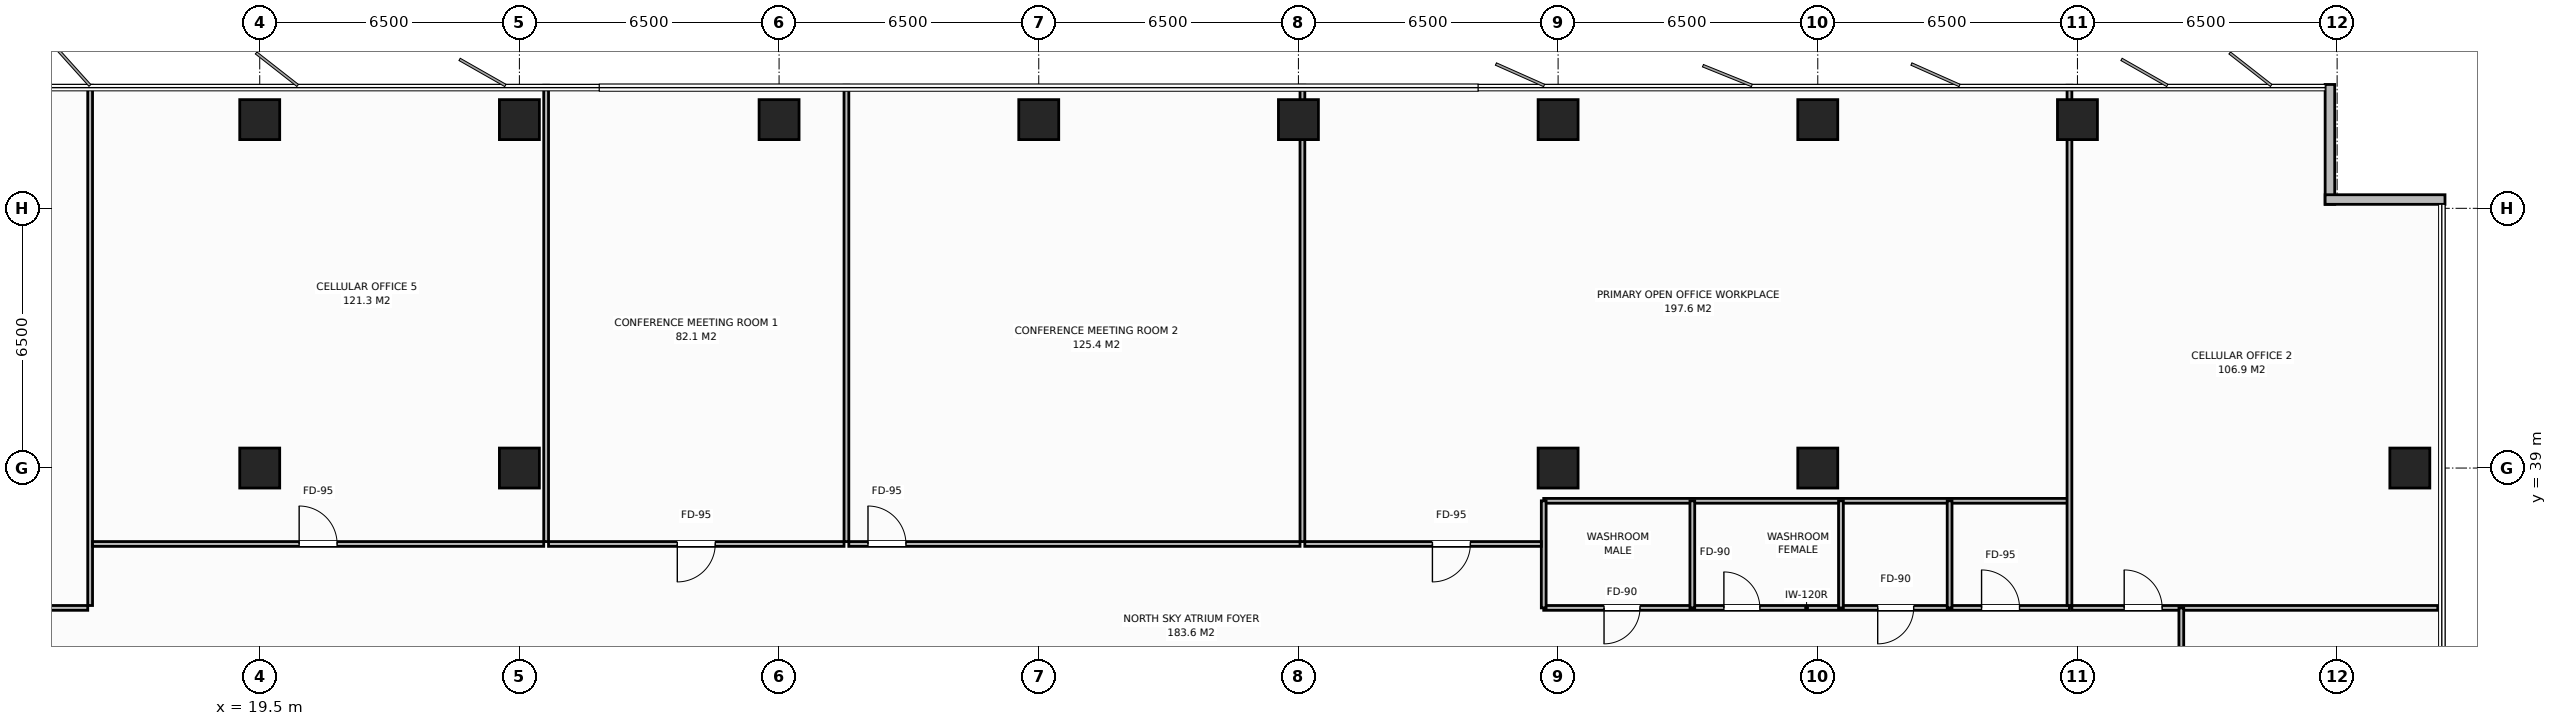
"""IFC4 building model, lengths in metres.
Left out: names, types, materials, properties, quantities, classifications, styles, units other than length and angle.
Written with IfcOpenShell. Run it as: python <this file> out.ifc"""

import sys

from ifc_helpers import new_model, si_unit, direction, frame, frame_2d, origin, origin_2d, place, context, subcontext, project, spatial, rectangle, extrude, element, fill, save


model = new_model("IFC4")
c1 = context("Model", 3, precision=1e-05, world=origin(), true_north=direction((0.0, 1.0)))
c2 = subcontext(c1, "Body", "Model", "MODEL_VIEW")
j1 = project(units=[si_unit("LENGTHUNIT", "METRE"), si_unit("PLANEANGLEUNIT", "RADIAN")], contexts=[c1])
p1 = place(None, origin())
s1 = spatial("IfcSite", under=j1, at=p1, CompositionType="ELEMENT")
p2 = place(p1, origin())
s2 = spatial("IfcBuilding", under=s1, at=p2, CompositionType="ELEMENT")
p3 = place(p2, frame((0.0, 0.0, 170.8)))
s3 = spatial("IfcBuildingStorey", under=s2, at=p3, CompositionType="ELEMENT", Elevation=170.8)
for number, where, z_axis, x_axis in (
    (1, (19.5, 39.0, 0.0), (0.0, 0.0, 1.0), (1.0, 0.0, 0.0)),
    (2, (58.5, 39.0, 0.0), (0.0, 0.0, 1.0), (1.0, 0.0, 0.0)),
    (3, (26.0, 39.0, 0.0), (0.0, 0.0, 1.0), (1.0, 0.0, 0.0)),
    (4, (52.0, 39.0, 0.0), (0.0, 0.0, 1.0), (1.0, 0.0, 0.0)),
    (5, (19.5, 47.72, 0.0), (0.0, 0.0, 1.0), (1.0, 0.0, 0.0)),
    (6, (26.0, 47.72, 0.0), (0.0, 0.0, 1.0), (1.0, 0.0, 0.0)),
    (7, (32.5, 47.72, 0.0), (0.0, 0.0, 1.0), (1.0, 0.0, 0.0)),
    (8, (39.0, 47.72, 0.0), (0.0, 0.0, 1.0), (1.0, 0.0, 0.0)),
    (9, (45.5, 47.72, 0.0), (0.0, 0.0, 1.0), (1.0, 0.0, 0.0)),
    (10, (52.0, 47.72, 0.0), (0.0, 0.0, 1.0), (1.0, 0.0, 0.0)),
    (11, (58.5, 47.72, 0.0), (0.0, 0.0, 1.0), (1.0, 0.0, 0.0)),
    (12, (65.0, 47.72, 0.0), (0.0, 0.0, 1.0), (1.0, 0.0, 0.0)),
    (13, (73.32, 39.0, 0.0), (0.0, 0.0, 1.0), (1.0, 0.0, 0.0)),
):
    element("IfcColumn", number, at=place(p3, frame(where, z_axis=z_axis, x_axis=x_axis)), inside=s3, PredefinedType="COLUMN", context=c2, shape_type="SweptSolid", body=[
        extrude(rectangle(XDim=1.0, YDim=1.0, at=origin_2d()), origin(), (0.0, 0.0, 1.0), 3.8),
    ])
for number, where, z_axis, x_axis in (
    (14, (71.32, 48.6, 0.0), (0.0, 0.0, 1.0), (0.0, -1.0, 0.0)),
    (15, (71.2, 45.72, 0.0), (0.0, 0.0, 1.0), (1.0, 0.0, 0.0)),
):
    element("IfcWall", number, at=place(p3, frame(where, z_axis=z_axis, x_axis=x_axis)), inside=s3, PredefinedType="STANDARD", context=c2, shape_type="SweptSolid", body=[
        extrude(rectangle(XDim=3.0, YDim=0.24, at=frame_2d((1.5, 0.0))), origin(), (0.0, 0.0, 1.0), 3.572),
    ])
p4 = place(p3, frame((51.64, 35.5, 0.0), z_axis=(0.0, 0.0, 1.0), x_axis=(1.0, 0.0, 0.0)))
e16 = element("IfcWall", 16, at=p4, inside=s3, PredefinedType="PARTITIONING", context=c2, shape_type="SweptSolid", body=[
    extrude(rectangle(XDim=13.16, YDim=0.12, at=frame_2d((6.58, 0.0))), origin(), (0.0, 0.0, 1.0), 3.572),
])
p5 = place(p4, frame((1.51, 0.0, 0.0)))
e17 = element("IfcOpeningElement", 17, at=p5, cuts=e16, PredefinedType="OPENING", context=c2, shape_type="SweptSolid", body=[
    extrude(rectangle(XDim=0.9, YDim=2.15, at=frame_2d((0.45, 1.075))), frame((0.0, 0.07, 0.0), z_axis=(0.0, -1.0, 0.0), x_axis=(1.0, 0.0, 0.0)), (0.0, 0.0, 1.0), 0.14),
])
p6 = place(p4, frame((4.51, 0.0, 0.0)))
e18 = element("IfcOpeningElement", 18, at=p6, cuts=e16, PredefinedType="OPENING", context=c2, shape_type="SweptSolid", body=[
    extrude(rectangle(XDim=0.9, YDim=2.15, at=frame_2d((0.45, 1.075))), frame((0.0, 0.07, 0.0), z_axis=(0.0, -1.0, 0.0), x_axis=(1.0, 0.0, 0.0)), (0.0, 0.0, 1.0), 0.14),
])
p7 = place(p4, frame((8.36, 0.0, 0.0)))
e19 = element("IfcOpeningElement", 19, at=p7, cuts=e16, PredefinedType="OPENING", context=c2, shape_type="SweptSolid", body=[
    extrude(rectangle(XDim=0.9, YDim=2.15, at=frame_2d((0.45, 1.075))), frame((0.0, 0.07, 0.0), z_axis=(0.0, -1.0, 0.0), x_axis=(1.0, 0.0, 0.0)), (0.0, 0.0, 1.0), 0.14),
])
p8 = place(p4, frame((10.96, 0.0, 0.0)))
e20 = element("IfcOpeningElement", 20, at=p8, cuts=e16, PredefinedType="OPENING", context=c2, shape_type="SweptSolid", body=[
    extrude(rectangle(XDim=0.95, YDim=2.15, at=frame_2d((0.475, 1.075))), frame((0.0, 0.07, 0.0), z_axis=(0.0, -1.0, 0.0), x_axis=(1.0, 0.0, 0.0)), (0.0, 0.0, 1.0), 0.14),
])
p9 = place(p3, frame((51.64, 38.18, 0.0), z_axis=(0.0, 0.0, 1.0), x_axis=(1.0, 0.0, 0.0)))
e21 = element("IfcWall", 21, at=p9, inside=s3, PredefinedType="PARTITIONING", context=c2, shape_type="SweptSolid", body=[
    extrude(rectangle(XDim=13.16, YDim=0.12, at=frame_2d((6.58, 0.0))), origin(), (0.0, 0.0, 1.0), 3.572),
])
for number, where, z_axis, x_axis in (
    (22, (51.64, 35.5, 0.0), (0.0, 0.0, 1.0), (0.0, 1.0, 0.0)),
    (23, (55.36, 35.5, 0.0), (0.0, 0.0, 1.0), (0.0, 1.0, 0.0)),
    (24, (59.08, 35.5, 0.0), (0.0, 0.0, 1.0), (0.0, 1.0, 0.0)),
    (25, (61.8, 35.5, 0.0), (0.0, 0.0, 1.0), (0.0, 1.0, 0.0)),
):
    element("IfcWall", number, at=place(p3, frame(where, z_axis=z_axis, x_axis=x_axis)), inside=s3, PredefinedType="PARTITIONING", context=c2, shape_type="SweptSolid", body=[
        extrude(rectangle(XDim=2.68, YDim=0.12, at=frame_2d((1.34, 0.0))), origin(), (0.0, 0.0, 1.0), 3.572),
    ])
p10 = place(p3, frame((15.255, 35.56, 0.0), z_axis=(0.0, 0.0, 1.0), x_axis=(0.0, 1.0, 0.0)))
e26 = element("IfcWall", 26, at=p10, inside=s3, PredefinedType="PARTITIONING", context=c2, shape_type="SweptSolid", body=[
    extrude(rectangle(XDim=13.02, YDim=0.12, at=frame_2d((6.51, 0.0))), origin(), (0.0, 0.0, 1.0), 3.572),
])
p11 = place(p3, frame((3.98, 35.5, 0.0), z_axis=(0.0, 0.0, 1.0), x_axis=(1.0, 0.0, 0.0)))
e27 = element("IfcWall", 27, at=p11, inside=s3, PredefinedType="PARTITIONING", context=c2, shape_type="SweptSolid", body=[
    extrude(rectangle(XDim=11.215, YDim=0.12, at=frame_2d((5.607, 0.0))), origin(), (0.0, 0.0, 1.0), 3.572),
])
p12 = place(p11, frame((6.9, 0.0, 0.0)))
e28 = element("IfcOpeningElement", 28, at=p12, cuts=e27, PredefinedType="OPENING", context=c2, shape_type="SweptSolid", body=[
    extrude(rectangle(XDim=0.95, YDim=2.15, at=frame_2d((0.475, 1.075))), frame((0.0, 0.07, 0.0), z_axis=(0.0, -1.0, 0.0), x_axis=(1.0, 0.0, 0.0)), (0.0, 0.0, 1.0), 0.14),
])
p13 = place(p3, frame((26.669, 37.16, 0.0), z_axis=(0.0, 0.0, 1.0), x_axis=(0.0, 1.0, 0.0)))
e29 = element("IfcWall", 29, at=p13, inside=s3, PredefinedType="PARTITIONING", context=c2, shape_type="SweptSolid", body=[
    extrude(rectangle(XDim=11.42, YDim=0.12, at=frame_2d((5.71, 0.0))), origin(), (0.0, 0.0, 1.0), 3.572),
])
p14 = place(p3, frame((15.315, 37.1, 0.0), z_axis=(0.0, 0.0, 1.0), x_axis=(1.0, 0.0, 0.0)))
e30 = element("IfcWall", 30, at=p14, inside=s3, PredefinedType="PARTITIONING", context=c2, shape_type="SweptSolid", body=[
    extrude(rectangle(XDim=11.294, YDim=0.12, at=frame_2d((5.647, 0.0))), origin(), (0.0, 0.0, 1.0), 3.572),
])
p15 = place(p14, frame((5.172, 0.0, 0.0)))
e31 = element("IfcOpeningElement", 31, at=p15, cuts=e30, PredefinedType="OPENING", context=c2, shape_type="SweptSolid", body=[
    extrude(rectangle(XDim=0.95, YDim=2.15, at=frame_2d((0.475, 1.075))), frame((0.0, 0.07, 0.0), z_axis=(0.0, -1.0, 0.0), x_axis=(1.0, 0.0, 0.0)), (0.0, 0.0, 1.0), 0.14),
])
p16 = place(p3, frame((34.186, 37.16, 0.0), z_axis=(0.0, 0.0, 1.0), x_axis=(0.0, 1.0, 0.0)))
e32 = element("IfcWall", 32, at=p16, inside=s3, PredefinedType="PARTITIONING", context=c2, shape_type="SweptSolid", body=[
    extrude(rectangle(XDim=11.42, YDim=0.12, at=frame_2d((5.71, 0.0))), origin(), (0.0, 0.0, 1.0), 3.572),
])
p17 = place(p3, frame((26.729, 37.1, 0.0), z_axis=(0.0, 0.0, 1.0), x_axis=(1.0, 0.0, 0.0)))
e33 = element("IfcWall", 33, at=p17, inside=s3, PredefinedType="PARTITIONING", context=c2, shape_type="SweptSolid", body=[
    extrude(rectangle(XDim=7.396, YDim=0.12, at=frame_2d((3.698, 0.0))), origin(), (0.0, 0.0, 1.0), 3.572),
])
p18 = place(p17, frame((3.223, 0.0, 0.0)))
e34 = element("IfcOpeningElement", 34, at=p18, cuts=e33, PredefinedType="OPENING", context=c2, shape_type="SweptSolid", body=[
    extrude(rectangle(XDim=0.95, YDim=2.15, at=frame_2d((0.475, 1.075))), frame((0.0, 0.07, 0.0), z_axis=(0.0, -1.0, 0.0), x_axis=(1.0, 0.0, 0.0)), (0.0, 0.0, 1.0), 0.14),
])
p19 = place(p3, frame((45.6, 37.16, 0.0), z_axis=(0.0, 0.0, 1.0), x_axis=(0.0, 1.0, 0.0)))
e35 = element("IfcWall", 35, at=p19, inside=s3, PredefinedType="PARTITIONING", context=c2, shape_type="SweptSolid", body=[
    extrude(rectangle(XDim=11.42, YDim=0.12, at=frame_2d((5.71, 0.0))), origin(), (0.0, 0.0, 1.0), 3.022),
])
p20 = place(p3, frame((34.246, 37.1, 0.0), z_axis=(0.0, 0.0, 1.0), x_axis=(1.0, 0.0, 0.0)))
e36 = element("IfcWall", 36, at=p20, inside=s3, PredefinedType="PARTITIONING", context=c2, shape_type="SweptSolid", body=[
    extrude(rectangle(XDim=11.294, YDim=0.12, at=frame_2d((5.647, 0.0))), origin(), (0.0, 0.0, 1.0), 3.572),
])
p21 = place(p20, frame((0.48, 0.0, 0.0)))
e37 = element("IfcOpeningElement", 37, at=p21, cuts=e36, PredefinedType="OPENING", context=c2, shape_type="SweptSolid", body=[
    extrude(rectangle(XDim=0.95, YDim=2.15, at=frame_2d((0.475, 1.075))), frame((0.0, 0.07, 0.0), z_axis=(0.0, -1.0, 0.0), x_axis=(1.0, 0.0, 0.0)), (0.0, 0.0, 1.0), 0.14),
])
p22 = place(p3, frame((64.8, 35.56, 0.0), z_axis=(0.0, 0.0, 1.0), x_axis=(0.0, 1.0, 0.0)))
e38 = element("IfcWall", 38, at=p22, inside=s3, PredefinedType="PARTITIONING", context=c2, shape_type="SweptSolid", body=[
    extrude(rectangle(XDim=13.02, YDim=0.12, at=frame_2d((6.51, 0.0))), origin(), (0.0, 0.0, 1.0), 3.022),
])
p23 = place(p3, frame((45.66, 37.1, 0.0), z_axis=(0.0, 0.0, 1.0), x_axis=(1.0, 0.0, 0.0)))
e39 = element("IfcWall", 39, at=p23, inside=s3, PredefinedType="PARTITIONING", context=c2, shape_type="SweptSolid", body=[
    extrude(rectangle(XDim=5.92, YDim=0.12, at=frame_2d((2.96, 0.0))), origin(), (0.0, 0.0, 1.0), 3.572),
])
p24 = place(p23, frame((3.194, 0.0, 0.0)))
e40 = element("IfcOpeningElement", 40, at=p24, cuts=e39, PredefinedType="OPENING", context=c2, shape_type="SweptSolid", body=[
    extrude(rectangle(XDim=0.95, YDim=2.15, at=frame_2d((0.475, 1.075))), frame((0.0, 0.07, 0.0), z_axis=(0.0, -1.0, 0.0), x_axis=(1.0, 0.0, 0.0)), (0.0, 0.0, 1.0), 0.14),
])
p25 = place(p3, frame((64.86, 35.5, 0.0), z_axis=(0.0, 0.0, 1.0), x_axis=(1.0, 0.0, 0.0)))
e41 = element("IfcWall", 41, at=p25, inside=s3, PredefinedType="PARTITIONING", context=c2, shape_type="SweptSolid", body=[
    extrude(rectangle(XDim=9.16, YDim=0.12, at=frame_2d((4.58, 0.0))), origin(), (0.0, 0.0, 1.0), 3.572),
])
p26 = place(p25, frame((1.31, 0.0, 0.0)))
e42 = element("IfcOpeningElement", 42, at=p26, cuts=e41, PredefinedType="OPENING", context=c2, shape_type="SweptSolid", body=[
    extrude(rectangle(XDim=0.95, YDim=2.15, at=frame_2d((0.475, 1.075))), frame((0.0, 0.07, 0.0), z_axis=(0.0, -1.0, 0.0), x_axis=(1.0, 0.0, 0.0)), (0.0, 0.0, 1.0), 0.14),
])
p27 = place(p3, frame((67.6, 26.0, 0.0), z_axis=(0.0, 0.0, 1.0), x_axis=(0.0, 1.0, 0.0)))
e43 = element("IfcWall", 43, at=p27, inside=s3, PredefinedType="PARTITIONING", context=c2, shape_type="SweptSolid", body=[
    extrude(rectangle(XDim=9.5, YDim=0.12, at=frame_2d((4.75, 0.0))), origin(), (0.0, 0.0, 1.0), 3.572),
])
p28 = place(p27, frame((3.225, 0.0, 0.0)))
e44 = element("IfcOpeningElement", 44, at=p28, cuts=e43, PredefinedType="OPENING", context=c2, shape_type="SweptSolid", body=[
    extrude(rectangle(XDim=0.95, YDim=2.15, at=frame_2d((0.475, 1.075))), frame((0.0, 0.07, 0.0), z_axis=(0.0, -1.0, 0.0), x_axis=(1.0, 0.0, 0.0)), (0.0, 0.0, 1.0), 0.14),
])
p29 = place(p5, origin())
e45 = element("IfcDoor", 45, at=p29, inside=s3, OperationType="SINGLE_SWING_RIGHT", PredefinedType="DOOR", context=c2, shape_type="SweptSolid", body=[
    extrude(rectangle(XDim=0.9, YDim=2.15, at=frame_2d((0.45, 1.075))), frame((0.0, 0.025, 0.0), z_axis=(0.0, -1.0, 0.0), x_axis=(1.0, 0.0, 0.0)), (0.0, 0.0, 1.0), 0.05),
])
fill(e17, e45)
p30 = place(p6, origin())
e46 = element("IfcDoor", 46, at=p30, inside=s3, OperationType="SINGLE_SWING_LEFT", PredefinedType="DOOR", context=c2, shape_type="SweptSolid", body=[
    extrude(rectangle(XDim=0.9, YDim=2.15, at=frame_2d((0.45, 1.075))), frame((0.0, 0.025, 0.0), z_axis=(0.0, -1.0, 0.0), x_axis=(1.0, 0.0, 0.0)), (0.0, 0.0, 1.0), 0.05),
])
fill(e18, e46)
p31 = place(p7, origin())
e47 = element("IfcDoor", 47, at=p31, inside=s3, OperationType="SINGLE_SWING_RIGHT", PredefinedType="DOOR", context=c2, shape_type="SweptSolid", body=[
    extrude(rectangle(XDim=0.9, YDim=2.15, at=frame_2d((0.45, 1.075))), frame((0.0, 0.025, 0.0), z_axis=(0.0, -1.0, 0.0), x_axis=(1.0, 0.0, 0.0)), (0.0, 0.0, 1.0), 0.05),
])
fill(e19, e47)
p32 = place(p8, origin())
e48 = element("IfcDoor", 48, at=p32, inside=s3, OperationType="SINGLE_SWING_LEFT", PredefinedType="DOOR", context=c2, shape_type="SweptSolid", body=[
    extrude(rectangle(XDim=0.95, YDim=2.15, at=frame_2d((0.475, 1.075))), frame((0.0, 0.025, 0.0), z_axis=(0.0, -1.0, 0.0), x_axis=(1.0, 0.0, 0.0)), (0.0, 0.0, 1.0), 0.05),
])
fill(e20, e48)
p33 = place(p15, origin())
e49 = element("IfcDoor", 49, at=p33, inside=s3, OperationType="SINGLE_SWING_LEFT", PredefinedType="DOOR", context=c2, shape_type="SweptSolid", body=[
    extrude(rectangle(XDim=0.95, YDim=2.15, at=frame_2d((0.475, 1.075))), frame((0.0, 0.025, 0.0), z_axis=(0.0, -1.0, 0.0), x_axis=(1.0, 0.0, 0.0)), (0.0, 0.0, 1.0), 0.05),
])
fill(e31, e49)
p34 = place(p18, origin())
e50 = element("IfcDoor", 50, at=p34, inside=s3, OperationType="SINGLE_SWING_RIGHT", PredefinedType="DOOR", context=c2, shape_type="SweptSolid", body=[
    extrude(rectangle(XDim=0.95, YDim=2.15, at=frame_2d((0.475, 1.075))), frame((0.0, 0.025, 0.0), z_axis=(0.0, -1.0, 0.0), x_axis=(1.0, 0.0, 0.0)), (0.0, 0.0, 1.0), 0.05),
])
fill(e34, e50)
p35 = place(p21, origin())
e51 = element("IfcDoor", 51, at=p35, inside=s3, OperationType="SINGLE_SWING_LEFT", PredefinedType="DOOR", context=c2, shape_type="SweptSolid", body=[
    extrude(rectangle(XDim=0.95, YDim=2.15, at=frame_2d((0.475, 1.075))), frame((0.0, 0.025, 0.0), z_axis=(0.0, -1.0, 0.0), x_axis=(1.0, 0.0, 0.0)), (0.0, 0.0, 1.0), 0.05),
])
fill(e37, e51)
p36 = place(p24, origin())
e52 = element("IfcDoor", 52, at=p36, inside=s3, OperationType="SINGLE_SWING_RIGHT", PredefinedType="DOOR", context=c2, shape_type="SweptSolid", body=[
    extrude(rectangle(XDim=0.95, YDim=2.15, at=frame_2d((0.475, 1.075))), frame((0.0, 0.025, 0.0), z_axis=(0.0, -1.0, 0.0), x_axis=(1.0, 0.0, 0.0)), (0.0, 0.0, 1.0), 0.05),
])
fill(e40, e52)
p37 = place(p26, origin())
e53 = element("IfcDoor", 53, at=p37, inside=s3, OperationType="SINGLE_SWING_LEFT", PredefinedType="DOOR", context=c2, shape_type="SweptSolid", body=[
    extrude(rectangle(XDim=0.95, YDim=2.15, at=frame_2d((0.475, 1.075))), frame((0.0, 0.025, 0.0), z_axis=(0.0, -1.0, 0.0), x_axis=(1.0, 0.0, 0.0)), (0.0, 0.0, 1.0), 0.05),
])
fill(e42, e53)
save(model, sys.argv[1])
